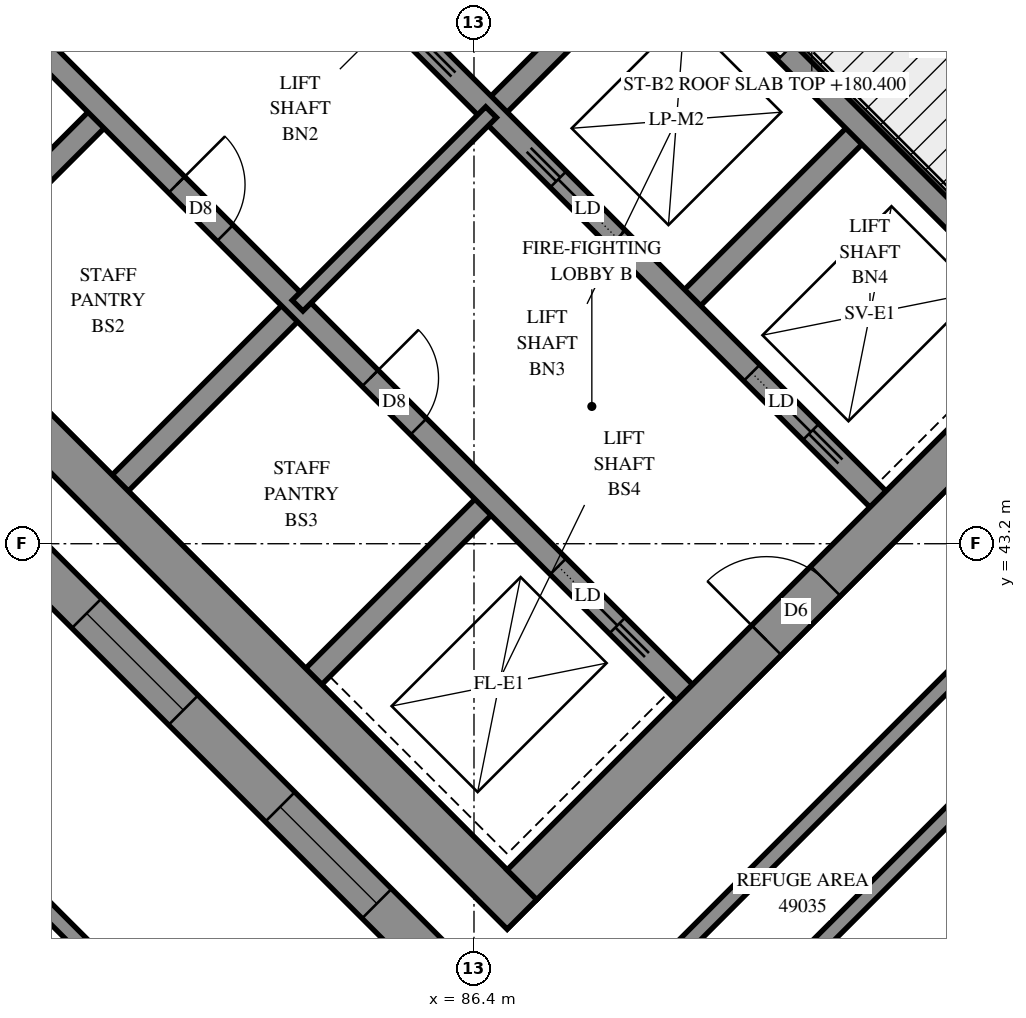
"""IFC4 building model, lengths in metres.
Left out: names, types, materials, properties, quantities, classifications, styles, units other than length and angle.
Written with IfcOpenShell. Run it as: python <this file> out.ifc"""

import sys

from ifc_helpers import new_model, si_unit, direction, frame, frame_2d, origin, place, context, subcontext, project, spatial, polyline, rectangle, outline, extrude, element, fill, save


model = new_model("IFC4")
c1 = context("Model", 3, precision=1e-05, world=origin(), true_north=direction((0.0, 1.0)))
c2 = subcontext(c1, "Body", "Model", "MODEL_VIEW")
j1 = project(units=[si_unit("LENGTHUNIT", "METRE"), si_unit("PLANEANGLEUNIT", "RADIAN")], contexts=[c1])
p1 = place(None, origin())
s1 = spatial("IfcSite", under=j1, at=p1, CompositionType="ELEMENT")
p2 = place(p1, origin())
s2 = spatial("IfcBuilding", under=s1, at=p2, CompositionType="ELEMENT")
p3 = place(p2, frame((0.0, 0.0, 180.4)))
s3 = spatial("IfcBuildingStorey", under=s2, at=p3, CompositionType="ELEMENT", Elevation=180.4)
p4 = place(p3, frame((76.071, 49.284, -0.3), z_axis=(0.0, 0.0, 1.0), x_axis=(0.7071035554, -0.707110007, 0.0)))
e1 = element("IfcWall", 1, at=p4, inside=s3, PredefinedType="SHEAR", context=c2, shape_type="SweptSolid", body=[
    extrude(rectangle(XDim=15.5, YDim=0.55, at=frame_2d((7.75, 0.0))), origin(), (0.0, 0.0, 1.0), 4.3),
])
p5 = place(p3, frame((86.642, 59.855, -0.3), z_axis=(0.0, 0.0, 1.0), x_axis=(0.707110007, -0.7071035554, 0.0)))
e2 = element("IfcWall", 2, at=p5, inside=s3, PredefinedType="SHEAR", context=c2, shape_type="SweptSolid", body=[
    extrude(rectangle(XDim=15.5, YDim=0.55, at=frame_2d((7.75, 0.0))), origin(), (0.0, 0.0, 1.0), 4.3),
])
p6 = place(p5, frame((10.55, 0.0, 0.3)))
e3 = element("IfcOpeningElement", 3, at=p6, cuts=e2, PredefinedType="OPENING", context=c2, shape_type="SweptSolid", body=[
    extrude(rectangle(XDim=0.8, YDim=2.1, at=frame_2d((0.4, 1.05))), frame((0.0, 0.285, 0.0), z_axis=(0.0, -1.0, 0.0), x_axis=(1.0, 0.0, 0.0)), (0.0, 0.0, 1.0), 0.57),
])
p7 = place(p3, frame((76.46, 49.284, -0.3), z_axis=(0.0, 0.0, 1.0), x_axis=(0.7071067812, 0.7071067812, 0.0)))
e4 = element("IfcWall", 4, at=p7, inside=s3, PredefinedType="SHEAR", context=c2, shape_type="SweptSolid", body=[
    extrude(rectangle(XDim=14.4, YDim=0.55, at=frame_2d((7.2, 0.0))), origin(), (0.0, 0.0, 1.0), 4.3),
])
p8 = place(p7, frame((4.55, 0.0, 0.3)))
e5 = element("IfcOpeningElement", 5, at=p8, cuts=e4, PredefinedType="OPENING", context=c2, shape_type="SweptSolid", body=[
    extrude(rectangle(XDim=1.1, YDim=2.1, at=frame_2d((0.55, 1.05))), frame((0.0, 0.285, 0.0), z_axis=(0.0, -1.0, 0.0), x_axis=(1.0, 0.0, 0.0)), (0.0, 0.0, 1.0), 0.57),
])
p9 = place(p7, frame((11.35, 0.0, 0.3)))
e6 = element("IfcOpeningElement", 6, at=p9, cuts=e4, PredefinedType="OPENING", context=c2, shape_type="SweptSolid", body=[
    extrude(rectangle(XDim=1.1, YDim=2.1, at=frame_2d((0.55, 1.05))), frame((0.0, 0.285, 0.0), z_axis=(0.0, -1.0, 0.0), x_axis=(1.0, 0.0, 0.0)), (0.0, 0.0, 1.0), 0.57),
])
p10 = place(p3, frame((87.031, 38.713, -0.3), z_axis=(0.0, 0.0, 1.0), x_axis=(0.707103309, 0.7071102534, 0.0)))
e7 = element("IfcWall", 7, at=p10, inside=s3, PredefinedType="SHEAR", context=c2, shape_type="SweptSolid", body=[
    extrude(rectangle(XDim=14.4, YDim=0.55, at=frame_2d((7.2, 0.0))), origin(), (0.0, 0.0, 1.0), 4.3),
])
p11 = place(p10, frame((4.55, 0.0, 0.3)))
e8 = element("IfcOpeningElement", 8, at=p11, cuts=e7, PredefinedType="OPENING", context=c2, shape_type="SweptSolid", body=[
    extrude(rectangle(XDim=1.1, YDim=2.1, at=frame_2d((0.55, 1.05))), frame((0.0, 0.285, 0.0), z_axis=(0.0, -1.0, 0.0), x_axis=(1.0, 0.0, 0.0)), (0.0, 0.0, 1.0), 0.57),
])
p12 = place(p10, frame((11.35, 0.0, 0.3)))
e9 = element("IfcOpeningElement", 9, at=p12, cuts=e7, PredefinedType="OPENING", context=c2, shape_type="SweptSolid", body=[
    extrude(rectangle(XDim=1.1, YDim=2.1, at=frame_2d((0.55, 1.05))), frame((0.0, 0.285, 0.0), z_axis=(0.0, -1.0, 0.0), x_axis=(1.0, 0.0, 0.0)), (0.0, 0.0, 1.0), 0.57),
])
p13 = place(p3, frame((79.2, 46.544, 0.0), z_axis=(0.0, 0.0, 1.0), x_axis=(0.7071219326, 0.7070916295, 0.0)))
e10 = element("IfcWall", 10, at=p13, inside=s3, PredefinedType="SOLIDWALL", context=c2, shape_type="SweptSolid", body=[
    extrude(rectangle(XDim=3.3, YDim=0.3, at=frame_2d((1.65, 0.0))), origin(), (0.0, 0.0, 1.0), 4.7),
])
p14 = place(p3, frame((81.746, 43.999, 0.0), z_axis=(0.0, 0.0, 1.0), x_axis=(0.7071067812, 0.7071067812, 0.0)))
e11 = element("IfcWall", 11, at=p14, inside=s3, PredefinedType="SOLIDWALL", context=c2, shape_type="SweptSolid", body=[
    extrude(rectangle(XDim=3.3, YDim=0.3, at=frame_2d((1.65, 0.0))), origin(), (0.0, 0.0, 1.0), 4.7),
])
p15 = place(p3, frame((86.625, 48.878, 0.0), z_axis=(0.0, 0.0, 1.0), x_axis=(0.7071067812, 0.7071067812, 0.0)))
e12 = element("IfcWall", 12, at=p15, inside=s3, PredefinedType="SOLIDWALL", context=c2, shape_type="SweptSolid", body=[
    extrude(rectangle(XDim=3.3, YDim=0.3, at=frame_2d((1.65, 0.0))), origin(), (0.0, 0.0, 1.0), 4.7),
])
p16 = place(p3, frame((84.291, 41.453, 0.0), z_axis=(0.0, 0.0, 1.0), x_axis=(0.7071067812, 0.7071067812, 0.0)))
e13 = element("IfcWall", 13, at=p16, inside=s3, PredefinedType="SOLIDWALL", context=c2, shape_type="SweptSolid", body=[
    extrude(rectangle(XDim=3.3, YDim=0.3, at=frame_2d((1.65, 0.0))), origin(), (0.0, 0.0, 1.0), 4.7),
])
p17 = place(p3, frame((89.17, 46.332, 0.0), z_axis=(0.0, 0.0, 1.0), x_axis=(0.7071067812, 0.7071067812, 0.0)))
e14 = element("IfcWall", 14, at=p17, inside=s3, PredefinedType="SOLIDWALL", context=c2, shape_type="SweptSolid", body=[
    extrude(rectangle(XDim=3.3, YDim=0.3, at=frame_2d((1.65, 0.0))), origin(), (0.0, 0.0, 1.0), 4.7),
])
p18 = place(p3, frame((78.988, 51.423, 0.0), z_axis=(0.0, 0.0, 1.0), x_axis=(0.7071067812, -0.7071067812, 0.0)))
e15 = element("IfcWall", 15, at=p18, inside=s3, PredefinedType="SOLIDWALL", context=c2, shape_type="SweptSolid", body=[
    extrude(rectangle(XDim=14.4, YDim=0.3, at=frame_2d((7.2, 0.0))), origin(), (0.0, 0.0, 1.0), 4.7),
])
p19 = place(p18, frame((1.35, 0.0, 0.0)))
e16 = element("IfcOpeningElement", 16, at=p19, cuts=e15, PredefinedType="OPENING", context=c2, shape_type="SweptSolid", body=[
    extrude(rectangle(XDim=0.9, YDim=2.1, at=frame_2d((0.45, 1.05))), frame((0.0, 0.16, 0.0), z_axis=(0.0, -1.0, 0.0), x_axis=(1.0, 0.0, 0.0)), (0.0, 0.0, 1.0), 0.32),
])
p20 = place(p18, frame((4.95, 0.0, 0.0)))
e17 = element("IfcOpeningElement", 17, at=p20, cuts=e15, PredefinedType="OPENING", context=c2, shape_type="SweptSolid", body=[
    extrude(rectangle(XDim=0.9, YDim=2.1, at=frame_2d((0.45, 1.05))), frame((0.0, 0.16, 0.0), z_axis=(0.0, -1.0, 0.0), x_axis=(1.0, 0.0, 0.0)), (0.0, 0.0, 1.0), 0.32),
])
p21 = place(p18, frame((8.55, 0.0, 0.0)))
e18 = element("IfcOpeningElement", 18, at=p21, cuts=e15, PredefinedType="OPENING", context=c2, shape_type="SweptSolid", body=[
    extrude(rectangle(XDim=0.9, YDim=2.1, at=frame_2d((0.45, 1.05))), frame((0.0, 0.16, 0.0), z_axis=(0.0, -1.0, 0.0), x_axis=(1.0, 0.0, 0.0)), (0.0, 0.0, 1.0), 0.32),
])
p22 = place(p18, frame((12.05, 0.0, 0.0)))
e19 = element("IfcOpeningElement", 19, at=p22, cuts=e15, PredefinedType="OPENING", context=c2, shape_type="SweptSolid", body=[
    extrude(rectangle(XDim=1.1, YDim=2.1, at=frame_2d((0.55, 1.05))), frame((0.0, 0.16, 0.0), z_axis=(0.0, -1.0, 0.0), x_axis=(1.0, 0.0, 0.0)), (0.0, 0.0, 1.0), 0.32),
])
p23 = place(p3, frame((81.534, 53.969, 0.0), z_axis=(0.0, 0.0, 1.0), x_axis=(0.707103309, -0.7071102534, 0.0)))
e20 = element("IfcWall", 20, at=p23, inside=s3, PredefinedType="SOLIDWALL", context=c2, shape_type="SweptSolid", body=[
    extrude(rectangle(XDim=14.4, YDim=0.3, at=frame_2d((7.2, 0.0))), origin(), (0.0, 0.0, 1.0), 4.7),
])
p24 = place(p23, frame((1.25, 0.0, 0.0)))
e21 = element("IfcOpeningElement", 21, at=p24, cuts=e20, PredefinedType="OPENING", context=c2, shape_type="SweptSolid", body=[
    extrude(rectangle(XDim=1.1, YDim=2.1, at=frame_2d((0.55, 1.05))), frame((0.0, 0.16, 0.0), z_axis=(0.0, -1.0, 0.0), x_axis=(1.0, 0.0, 0.0)), (0.0, 0.0, 1.0), 0.32),
])
p25 = place(p23, frame((4.85, 0.0, 0.0)))
e22 = element("IfcOpeningElement", 22, at=p25, cuts=e20, PredefinedType="OPENING", context=c2, shape_type="SweptSolid", body=[
    extrude(rectangle(XDim=1.1, YDim=2.1, at=frame_2d((0.55, 1.05))), frame((0.0, 0.16, 0.0), z_axis=(0.0, -1.0, 0.0), x_axis=(1.0, 0.0, 0.0)), (0.0, 0.0, 1.0), 0.32),
])
p26 = place(p23, frame((8.45, 0.0, 0.0)))
e23 = element("IfcOpeningElement", 23, at=p26, cuts=e20, PredefinedType="OPENING", context=c2, shape_type="SweptSolid", body=[
    extrude(rectangle(XDim=1.1, YDim=2.1, at=frame_2d((0.55, 1.05))), frame((0.0, 0.16, 0.0), z_axis=(0.0, -1.0, 0.0), x_axis=(1.0, 0.0, 0.0)), (0.0, 0.0, 1.0), 0.32),
])
p27 = place(p23, frame((12.05, 0.0, 0.0)))
e24 = element("IfcOpeningElement", 24, at=p27, cuts=e20, PredefinedType="OPENING", context=c2, shape_type="SweptSolid", body=[
    extrude(rectangle(XDim=1.1, YDim=2.1, at=frame_2d((0.55, 1.05))), frame((0.0, 0.16, 0.0), z_axis=(0.0, -1.0, 0.0), x_axis=(1.0, 0.0, 0.0)), (0.0, 0.0, 1.0), 0.32),
])
p28 = place(p3, frame((88.958, 51.211, 0.0), z_axis=(0.0, 0.0, 1.0), x_axis=(0.7070998367, -0.7071137256, 0.0)))
e25 = element("IfcWall", 25, at=p28, inside=s3, PredefinedType="SOLIDWALL", context=c2, shape_type="SweptSolid", body=[
    extrude(rectangle(XDim=7.2, YDim=0.3, at=frame_2d((3.6, 0.0))), origin(), (0.0, 0.0, 1.0), 4.7),
])
p29 = place(p3, frame((100.024, 48.241, 0.0), z_axis=(0.0, 0.0, 1.0), x_axis=(-0.7071067812, 0.7071067812, 0.0)))
e26 = element("IfcWall", 26, at=p29, inside=s3, PredefinedType="SOLIDWALL", context=c2, shape_type="SweptSolid", body=[
    extrude(outline(polyline([(-0.275, -0.275), (30.779, -0.275), (30.552, 0.275), (0.275, 0.275), (-0.275, -0.275)])), origin(), (0.0, 0.0, 1.0), 4.7),
])
p30 = place(p29, frame((3.625, 0.0, 0.9)))
e27 = element("IfcOpeningElement", 27, at=p30, cuts=e26, PredefinedType="OPENING", context=c2, shape_type="SweptSolid", body=[
    extrude(rectangle(XDim=1.8, YDim=3.6, at=frame_2d((0.9, 1.8))), frame((0.0, 0.285, 0.0), z_axis=(0.0, -1.0, 0.0), x_axis=(1.0, 0.0, 0.0)), (0.0, 0.0, 1.0), 0.57),
])
p31 = place(p29, frame((7.225, 0.0, 0.9)))
e28 = element("IfcOpeningElement", 28, at=p31, cuts=e26, PredefinedType="OPENING", context=c2, shape_type="SweptSolid", body=[
    extrude(rectangle(XDim=1.8, YDim=3.6, at=frame_2d((0.9, 1.8))), frame((0.0, 0.285, 0.0), z_axis=(0.0, -1.0, 0.0), x_axis=(1.0, 0.0, 0.0)), (0.0, 0.0, 1.0), 0.57),
])
p32 = place(p29, frame((10.825, 0.0, 0.9)))
e29 = element("IfcOpeningElement", 29, at=p32, cuts=e26, PredefinedType="OPENING", context=c2, shape_type="SweptSolid", body=[
    extrude(rectangle(XDim=1.8, YDim=3.6, at=frame_2d((0.9, 1.8))), frame((0.0, 0.285, 0.0), z_axis=(0.0, -1.0, 0.0), x_axis=(1.0, 0.0, 0.0)), (0.0, 0.0, 1.0), 0.57),
])
p33 = place(p29, frame((14.425, 0.0, 0.9)))
e30 = element("IfcOpeningElement", 30, at=p33, cuts=e26, PredefinedType="OPENING", context=c2, shape_type="SweptSolid", body=[
    extrude(rectangle(XDim=1.8, YDim=3.6, at=frame_2d((0.9, 1.8))), frame((0.0, 0.285, 0.0), z_axis=(0.0, -1.0, 0.0), x_axis=(1.0, 0.0, 0.0)), (0.0, 0.0, 1.0), 0.57),
])
p34 = place(p29, frame((17.575, 0.0, 0.9)))
e31 = element("IfcOpeningElement", 31, at=p34, cuts=e26, PredefinedType="OPENING", context=c2, shape_type="SweptSolid", body=[
    extrude(rectangle(XDim=1.8, YDim=3.6, at=frame_2d((0.9, 1.8))), frame((0.0, 0.285, 0.0), z_axis=(0.0, -1.0, 0.0), x_axis=(1.0, 0.0, 0.0)), (0.0, 0.0, 1.0), 0.57),
])
p35 = place(p29, frame((21.625, 0.0, 0.9)))
e32 = element("IfcOpeningElement", 32, at=p35, cuts=e26, PredefinedType="OPENING", context=c2, shape_type="SweptSolid", body=[
    extrude(rectangle(XDim=1.8, YDim=3.6, at=frame_2d((0.9, 1.8))), frame((0.0, 0.285, 0.0), z_axis=(0.0, -1.0, 0.0), x_axis=(1.0, 0.0, 0.0)), (0.0, 0.0, 1.0), 0.57),
])
p36 = place(p29, frame((25.225, 0.0, 0.9)))
e33 = element("IfcOpeningElement", 33, at=p36, cuts=e26, PredefinedType="OPENING", context=c2, shape_type="SweptSolid", body=[
    extrude(rectangle(XDim=1.8, YDim=3.6, at=frame_2d((0.9, 1.8))), frame((0.0, 0.285, 0.0), z_axis=(0.0, -1.0, 0.0), x_axis=(1.0, 0.0, 0.0)), (0.0, 0.0, 1.0), 0.57),
])
p37 = place(p29, frame((28.438, 0.0, 0.9)))
e34 = element("IfcOpeningElement", 34, at=p37, cuts=e26, PredefinedType="OPENING", context=c2, shape_type="SweptSolid", body=[
    extrude(rectangle(XDim=1.8, YDim=3.6, at=frame_2d((0.9, 1.8))), frame((0.0, 0.285, 0.0), z_axis=(0.0, -1.0, 0.0), x_axis=(1.0, 0.0, 0.0)), (0.0, 0.0, 1.0), 0.57),
])
p38 = place(p3, frame((78.312, 45.275, 0.0), z_axis=(0.0, 0.0, 1.0), x_axis=(0.7071035873, -0.707109975, 0.0)))
e35 = element("IfcWall", 35, at=p38, inside=s3, PredefinedType="SOLIDWALL", context=c2, shape_type="SweptSolid", body=[
    extrude(outline(polyline([(0.114, -0.275), (15.93, -0.275), (15.38, 0.275), (-0.114, 0.275), (0.114, -0.275)])), origin(), (0.0, 0.0, 1.0), 4.7),
])
p39 = place(p38, frame((4.23, 0.0, 0.9)))
e36 = element("IfcOpeningElement", 36, at=p39, cuts=e35, PredefinedType="OPENING", context=c2, shape_type="SweptSolid", body=[
    extrude(rectangle(XDim=1.8, YDim=3.6, at=frame_2d((0.9, 1.8))), frame((0.0, 0.285, 0.0), z_axis=(0.0, -1.0, 0.0), x_axis=(1.0, 0.0, 0.0)), (0.0, 0.0, 1.0), 0.57),
])
p40 = place(p38, frame((7.83, 0.0, 0.9)))
e37 = element("IfcOpeningElement", 37, at=p40, cuts=e35, PredefinedType="OPENING", context=c2, shape_type="SweptSolid", body=[
    extrude(rectangle(XDim=1.8, YDim=3.6, at=frame_2d((0.9, 1.8))), frame((0.0, 0.285, 0.0), z_axis=(0.0, -1.0, 0.0), x_axis=(1.0, 0.0, 0.0)), (0.0, 0.0, 1.0), 0.57),
])
p41 = place(p38, frame((10.53, 0.0, 0.9)))
e38 = element("IfcOpeningElement", 38, at=p41, cuts=e35, PredefinedType="OPENING", context=c2, shape_type="SweptSolid", body=[
    extrude(rectangle(XDim=1.8, YDim=3.6, at=frame_2d((0.9, 1.8))), frame((0.0, 0.285, 0.0), z_axis=(0.0, -1.0, 0.0), x_axis=(1.0, 0.0, 0.0)), (0.0, 0.0, 1.0), 0.57),
])
p42 = place(p3, frame((89.382, 34.205, 0.0), z_axis=(0.0, 0.0, 1.0), x_axis=(0.7071067812, 0.7071067812, 0.0)))
e39 = element("IfcWall", 39, at=p42, inside=s3, PredefinedType="SOLIDWALL", context=c2, shape_type="SweptSolid", body=[
    extrude(outline(polyline([(-0.275, -0.275), (15.325, -0.275), (14.775, 0.275), (0.275, 0.275), (-0.275, -0.275)])), origin(), (0.0, 0.0, 1.0), 4.7),
])
p43 = place(p42, frame((2.425, 0.0, 0.9)))
e40 = element("IfcOpeningElement", 40, at=p43, cuts=e39, PredefinedType="OPENING", context=c2, shape_type="SweptSolid", body=[
    extrude(rectangle(XDim=1.8, YDim=3.6, at=frame_2d((0.9, 1.8))), frame((0.0, 0.285, 0.0), z_axis=(0.0, -1.0, 0.0), x_axis=(1.0, 0.0, 0.0)), (0.0, 0.0, 1.0), 0.57),
])
p44 = place(p42, frame((5.875, 0.0, 0.9)))
e41 = element("IfcOpeningElement", 41, at=p44, cuts=e39, PredefinedType="OPENING", context=c2, shape_type="SweptSolid", body=[
    extrude(rectangle(XDim=1.8, YDim=3.6, at=frame_2d((0.9, 1.8))), frame((0.0, 0.285, 0.0), z_axis=(0.0, -1.0, 0.0), x_axis=(1.0, 0.0, 0.0)), (0.0, 0.0, 1.0), 0.57),
])
p45 = place(p42, frame((9.775, 0.0, 0.9)))
e42 = element("IfcOpeningElement", 42, at=p45, cuts=e39, PredefinedType="OPENING", context=c2, shape_type="SweptSolid", body=[
    extrude(rectangle(XDim=1.8, YDim=3.6, at=frame_2d((0.9, 1.8))), frame((0.0, 0.285, 0.0), z_axis=(0.0, -1.0, 0.0), x_axis=(1.0, 0.0, 0.0)), (0.0, 0.0, 1.0), 0.57),
])
p46 = place(p3, frame((77.018, 42.15, 0.0), z_axis=(0.0, 0.0, 1.0), x_axis=(0.7071039217, -0.7071096407, 0.0)))
e43 = element("IfcWall", 43, at=p46, inside=s3, PredefinedType="SOLIDWALL", context=c2, shape_type="SweptSolid", body=[
    extrude(outline(polyline([(0.041, -0.1), (17.586, -0.1), (17.386, 0.1), (-0.041, 0.1), (0.041, -0.1)])), origin(), (0.0, 0.0, 1.0), 4.7),
])
p47 = place(p3, frame((89.382, 29.786, 0.0), z_axis=(0.0, 0.0, 1.0), x_axis=(0.7071094267, 0.7071041357, 0.0)))
e44 = element("IfcWall", 44, at=p47, inside=s3, PredefinedType="SOLIDWALL", context=c2, shape_type="SweptSolid", body=[
    extrude(outline(polyline([(-0.1, -0.1), (19.0, -0.1), (18.8, 0.1), (0.1, 0.1), (-0.1, -0.1)])), origin(), (0.0, 0.0, 1.0), 4.7),
])
p48 = place(p3, frame((91.313, 53.354, 0.0), z_axis=(0.0, 0.0, 1.0), x_axis=(0.7071067812, -0.7071067812, 0.0)))
e45 = element("IfcWall", 45, at=p48, inside=s3, PredefinedType="PARTITIONING", context=c2, shape_type="SweptSolid", body=[
    extrude(rectangle(XDim=5.65, YDim=0.15, at=frame_2d((2.825, 0.0))), origin(), (0.0, 0.0, 1.0), 4.7),
])
p49 = place(p3, frame((84.079, 46.332, 0.0), z_axis=(0.0, 0.0, 1.0), x_axis=(0.7071067812, 0.7071067812, 0.0)))
e46 = element("IfcWall", 46, at=p49, inside=s3, PredefinedType="PARTITIONING", context=c2, shape_type="SweptSolid", body=[
    extrude(rectangle(XDim=3.6, YDim=0.2, at=frame_2d((1.8, 0.0))), origin(), (0.0, 0.0, 1.0), 4.7),
])
p50 = place(p3, frame((88.495, 35.481, 0.0), z_axis=(0.0, 0.0, 1.0), x_axis=(0.7072325932, 0.7069809467, 0.0)))
e47 = element("IfcWall", 47, at=p50, inside=s3, PredefinedType="PARTITIONING", context=c2, shape_type="SweptSolid", body=[
    extrude(rectangle(XDim=7.55, YDim=0.2, at=frame_2d((3.775, 0.0))), origin(), (0.0, 0.0, 1.0), 4.7),
])
p51 = place(p3, frame((87.614, 36.363, 0.0), z_axis=(0.0, 0.0, 1.0), x_axis=(0.7071001576, 0.7071134047, 0.0)))
e48 = element("IfcWall", 48, at=p51, inside=s3, PredefinedType="PARTITIONING", context=c2, shape_type="SweptSolid", body=[
    extrude(rectangle(XDim=7.549, YDim=0.2, at=frame_2d((3.774, 0.0))), origin(), (0.0, 0.0, 1.0), 4.7),
])
p52 = place(p51, frame((0.595, 0.0, 0.0)))
e49 = element("IfcOpeningElement", 49, at=p52, cuts=e48, PredefinedType="OPENING", context=c2, shape_type="SweptSolid", body=[
    extrude(rectangle(XDim=1.0, YDim=2.1, at=frame_2d((0.5, 1.05))), frame((0.0, 0.11, 0.0), z_axis=(0.0, -1.0, 0.0), x_axis=(1.0, 0.0, 0.0)), (0.0, 0.0, 1.0), 0.22),
])
p53 = place(p39, origin())
e50 = element("IfcWindow", 50, at=p53, inside=s3, PartitioningType="SINGLE_PANEL", PredefinedType="WINDOW", context=c2, shape_type="SweptSolid", body=[
    extrude(rectangle(XDim=1.8, YDim=3.6, at=frame_2d((0.9, 1.8))), frame((0.0, 0.155, 0.0), z_axis=(0.0, -1.0, 0.0), x_axis=(1.0, 0.0, 0.0)), (0.0, 0.0, 1.0), 0.06),
])
fill(e36, e50)
p54 = place(p40, origin())
e51 = element("IfcWindow", 51, at=p54, inside=s3, PartitioningType="SINGLE_PANEL", PredefinedType="WINDOW", context=c2, shape_type="SweptSolid", body=[
    extrude(rectangle(XDim=1.8, YDim=3.6, at=frame_2d((0.9, 1.8))), frame((0.0, 0.155, 0.0), z_axis=(0.0, -1.0, 0.0), x_axis=(1.0, 0.0, 0.0)), (0.0, 0.0, 1.0), 0.06),
])
fill(e37, e51)
p55 = place(p11, origin())
e52 = element("IfcDoor", 52, at=p55, inside=s3, OperationType="DOUBLE_DOOR_SINGLE_SWING", PredefinedType="DOOR", context=c2, shape_type="SweptSolid", body=[
    extrude(rectangle(XDim=1.1, YDim=2.1, at=frame_2d((0.55, 1.05))), frame((0.0, 0.025, 0.0), z_axis=(0.0, -1.0, 0.0), x_axis=(1.0, 0.0, 0.0)), (0.0, 0.0, 1.0), 0.05),
])
fill(e8, e52)
p56 = place(p20, origin())
e53 = element("IfcDoor", 53, at=p56, inside=s3, OperationType="SINGLE_SWING_LEFT", PredefinedType="DOOR", context=c2, shape_type="SweptSolid", body=[
    extrude(rectangle(XDim=0.9, YDim=2.1, at=frame_2d((0.45, 1.05))), frame((0.0, 0.025, 0.0), z_axis=(0.0, -1.0, 0.0), x_axis=(1.0, 0.0, 0.0)), (0.0, 0.0, 1.0), 0.05),
])
fill(e17, e53)
p57 = place(p21, origin())
e54 = element("IfcDoor", 54, at=p57, inside=s3, OperationType="SINGLE_SWING_LEFT", PredefinedType="DOOR", context=c2, shape_type="SweptSolid", body=[
    extrude(rectangle(XDim=0.9, YDim=2.1, at=frame_2d((0.45, 1.05))), frame((0.0, 0.025, 0.0), z_axis=(0.0, -1.0, 0.0), x_axis=(1.0, 0.0, 0.0)), (0.0, 0.0, 1.0), 0.05),
])
fill(e18, e54)
p58 = place(p22, origin())
e55 = element("IfcDoor", 55, at=p58, inside=s3, OperationType="SLIDING_TO_RIGHT", PredefinedType="DOOR", context=c2, shape_type="SweptSolid", body=[
    extrude(rectangle(XDim=1.1, YDim=2.1, at=frame_2d((0.55, 1.05))), frame((0.0, 0.025, 0.0), z_axis=(0.0, -1.0, 0.0), x_axis=(1.0, 0.0, 0.0)), (0.0, 0.0, 1.0), 0.05),
])
fill(e19, e55)
p59 = place(p26, origin())
e56 = element("IfcDoor", 56, at=p59, inside=s3, OperationType="SLIDING_TO_LEFT", PredefinedType="DOOR", context=c2, shape_type="SweptSolid", body=[
    extrude(rectangle(XDim=1.1, YDim=2.1, at=frame_2d((0.55, 1.05))), frame((0.0, 0.025, 0.0), z_axis=(0.0, -1.0, 0.0), x_axis=(1.0, 0.0, 0.0)), (0.0, 0.0, 1.0), 0.05),
])
fill(e23, e56)
p60 = place(p27, origin())
e57 = element("IfcDoor", 57, at=p60, inside=s3, OperationType="SLIDING_TO_RIGHT", PredefinedType="DOOR", context=c2, shape_type="SweptSolid", body=[
    extrude(rectangle(XDim=1.1, YDim=2.1, at=frame_2d((0.55, 1.05))), frame((0.0, 0.025, 0.0), z_axis=(0.0, -1.0, 0.0), x_axis=(1.0, 0.0, 0.0)), (0.0, 0.0, 1.0), 0.05),
])
fill(e24, e57)
save(model, sys.argv[1])
